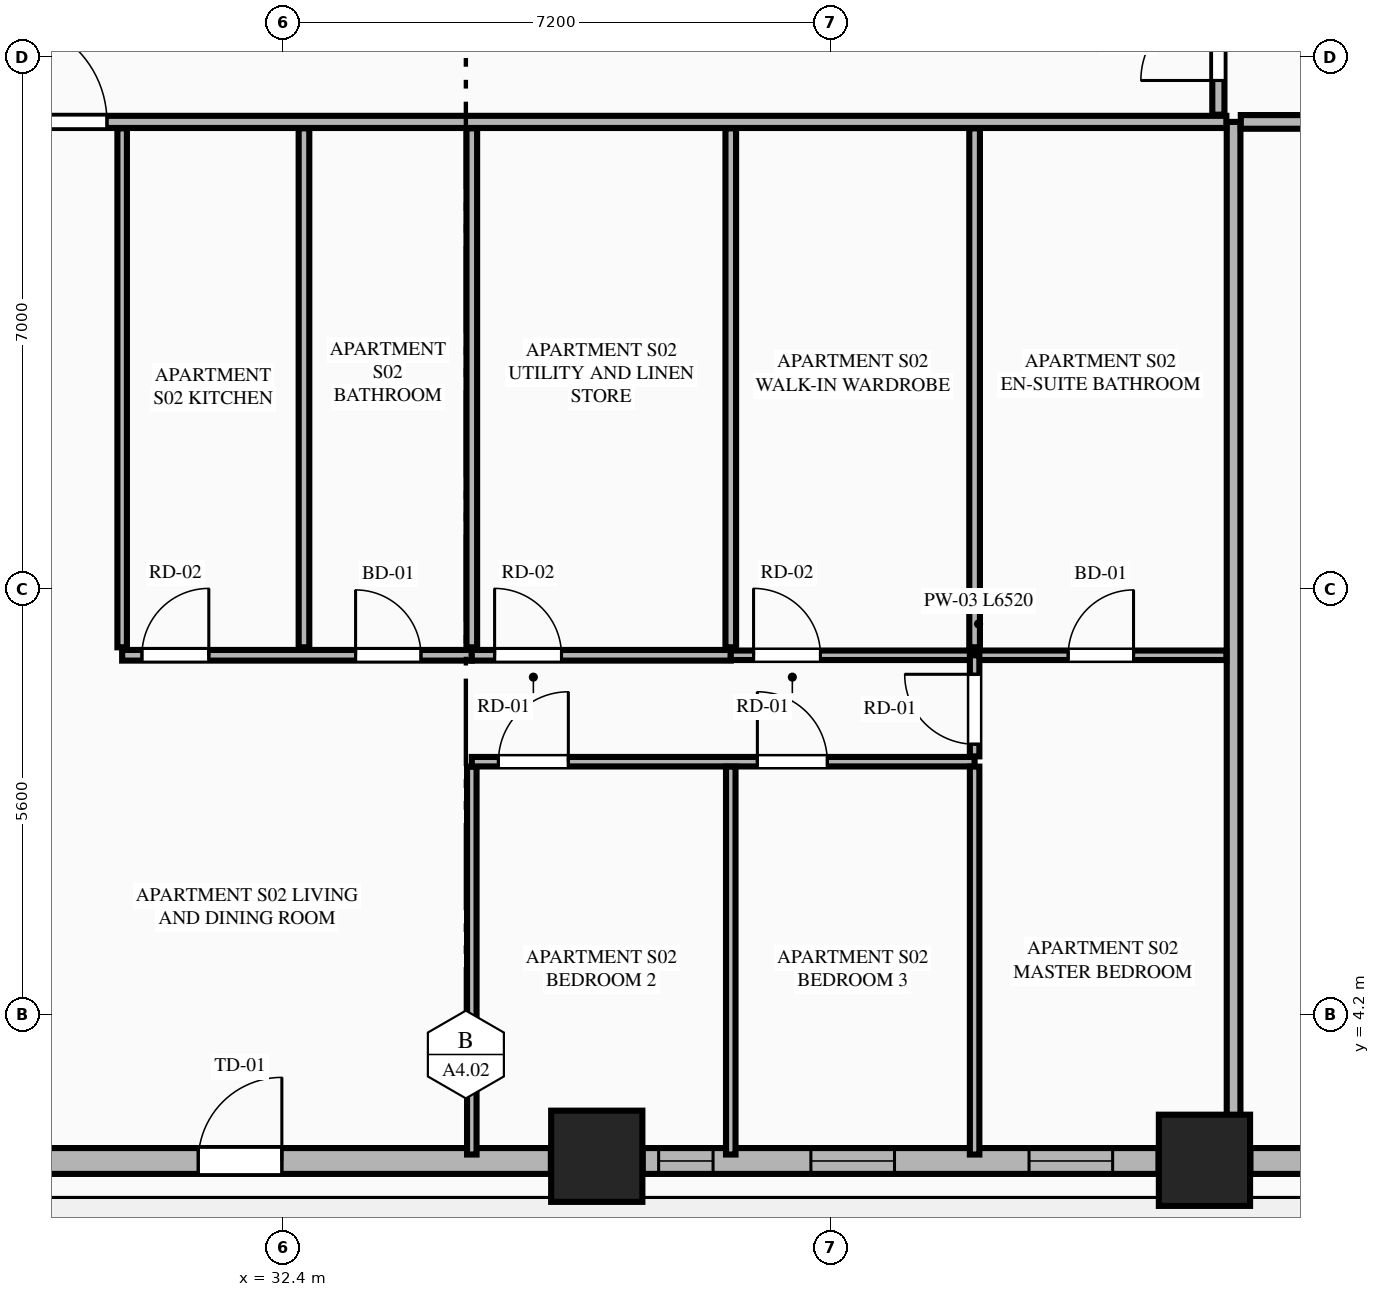
"""IFC4 building model, lengths in metres.
Left out: names, types, materials, properties, quantities, classifications, styles, units other than length and angle.
Written with IfcOpenShell. Run it as: python <this file> out.ifc"""

import sys

from ifc_helpers import new_model, si_unit, direction, frame, frame_2d, origin, origin_2d, place, context, subcontext, project, spatial, rectangle, extrude, element, fill, save


model = new_model("IFC4")
c1 = context("Model", 3, precision=1e-05, world=origin(), true_north=direction((0.0, 1.0)))
c2 = subcontext(c1, "Body", "Model", "MODEL_VIEW")
j1 = project(units=[si_unit("LENGTHUNIT", "METRE"), si_unit("PLANEANGLEUNIT", "RADIAN")], contexts=[c1])
p1 = place(None, origin())
s1 = spatial("IfcSite", under=j1, at=p1, CompositionType="ELEMENT")
p2 = place(p1, origin())
s2 = spatial("IfcBuilding", under=s1, at=p2, CompositionType="ELEMENT")
p3 = place(p2, frame((0.0, 0.0, 32.0)))
s3 = spatial("IfcBuildingStorey", under=s2, at=p3, CompositionType="ELEMENT", Elevation=32.0)
for number, where, z_axis, x_axis in (
    (1, (36.522, 2.342, 0.0), (0.0, 0.0, 1.0), (1.0, 0.0, 0.0)),
    (2, (44.517, 2.289, 0.0), (0.0, 0.0, 1.0), (1.0, 0.0, 0.0)),
):
    element("IfcColumn", number, at=place(p3, frame(where, z_axis=z_axis, x_axis=x_axis)), inside=s3, PredefinedType="COLUMN", context=c2, shape_type="SweptSolid", body=[
        extrude(rectangle(XDim=1.2, YDim=1.2, at=origin_2d()), origin(), (0.0, 0.0, 1.0), 3.55),
    ])
p4 = place(p3, frame((28.882, 2.28, 0.0), z_axis=(0.0, 0.0, 1.0), x_axis=(1.0, 0.0, 0.0)))
e3 = element("IfcWall", 3, at=p4, inside=s3, PredefinedType="STANDARD", context=c2, shape_type="SweptSolid", body=[
    extrude(rectangle(XDim=7.036, YDim=0.34, at=frame_2d((3.518, 0.0))), origin(), (0.0, 0.0, 1.0), 2.787),
])
p5 = place(p4, frame((2.397, 0.0, 0.0)))
e4 = element("IfcOpeningElement", 4, at=p5, cuts=e3, PredefinedType="OPENING", context=c2, shape_type="SweptSolid", body=[
    extrude(rectangle(XDim=1.1, YDim=2.25, at=frame_2d((0.55, 1.125))), frame((0.0, 0.18, 0.0), z_axis=(0.0, -1.0, 0.0), x_axis=(1.0, 0.0, 0.0)), (0.0, 0.0, 1.0), 0.36),
])
p6 = place(p3, frame((37.126, 2.28, 0.0), z_axis=(0.0, 0.0, 1.0), x_axis=(1.0, 0.0, 0.0)))
e5 = element("IfcWall", 5, at=p6, inside=s3, PredefinedType="STANDARD", context=c2, shape_type="SweptSolid", body=[
    extrude(rectangle(XDim=6.787, YDim=0.34, at=frame_2d((3.394, 0.0))), origin(), (0.0, 0.0, 1.0), 2.787),
])
p7 = place(p6, frame((2.213, 0.0, 0.75)))
e6 = element("IfcOpeningElement", 6, at=p7, cuts=e5, PredefinedType="OPENING", context=c2, shape_type="SweptSolid", body=[
    extrude(rectangle(XDim=1.1, YDim=1.887, at=frame_2d((0.55, 0.943))), frame((0.0, 0.18, 0.0), z_axis=(0.0, -1.0, 0.0), x_axis=(1.0, 0.0, 0.0)), (0.0, 0.0, 1.0), 0.36),
])
p8 = place(p6, frame((5.083, 0.0, 0.75)))
e7 = element("IfcOpeningElement", 7, at=p8, cuts=e5, PredefinedType="OPENING", context=c2, shape_type="SweptSolid", body=[
    extrude(rectangle(XDim=1.1, YDim=1.887, at=frame_2d((0.55, 0.943))), frame((0.0, 0.18, 0.0), z_axis=(0.0, -1.0, 0.0), x_axis=(1.0, 0.0, 0.0)), (0.0, 0.0, 1.0), 0.36),
])
p9 = place(p6, frame((0.21, 0.0, 0.75)))
e8 = element("IfcOpeningElement", 8, at=p9, cuts=e5, PredefinedType="OPENING", context=c2, shape_type="SweptSolid", body=[
    extrude(rectangle(XDim=0.716, YDim=1.887, at=frame_2d((0.358, 0.943))), frame((0.0, 0.18, 0.0), z_axis=(0.0, -1.0, 0.0), x_axis=(1.0, 0.0, 0.0)), (0.0, 0.0, 1.0), 0.36),
])
p10 = place(p3, frame((45.121, 2.28, 0.0), z_axis=(0.0, 0.0, 1.0), x_axis=(1.0, 0.0, 0.0)))
e9 = element("IfcWall", 9, at=p10, inside=s3, PredefinedType="STANDARD", context=c2, shape_type="SweptSolid", body=[
    extrude(rectangle(XDim=1.245, YDim=0.34, at=frame_2d((0.623, 0.0))), origin(), (0.0, 0.0, 1.0), 3.33),
])
p11 = place(p3, frame((44.9, 2.455, 0.0), z_axis=(0.0, 0.0, 1.0), x_axis=(0.0, 1.0, 0.0)))
e10 = element("IfcWall", 10, at=p11, inside=s3, PredefinedType="PARTITIONING", context=c2, shape_type="SweptSolid", body=[
    extrude(rectangle(XDim=13.495, YDim=0.18, at=frame_2d((6.748, 0.0))), origin(), (0.0, 0.0, 1.0), 3.33),
])
p12 = place(p3, frame((28.373, 15.95, 0.0), z_axis=(0.0, 0.0, 1.0), x_axis=(1.0, 0.0, 0.0)))
e11 = element("IfcWall", 11, at=p12, inside=s3, PredefinedType="PARTITIONING", context=c2, shape_type="SweptSolid", body=[
    extrude(rectangle(XDim=16.432, YDim=0.16, at=frame_2d((8.216, 0.0))), origin(), (0.0, 0.0, 1.0), 3.33),
])
p13 = place(p12, frame((0.355, 0.0, 0.0)))
e12 = element("IfcOpeningElement", 12, at=p13, cuts=e11, PredefinedType="OPENING", context=c2, shape_type="SweptSolid", body=[
    extrude(rectangle(XDim=1.35, YDim=2.35, at=frame_2d((0.675, 1.175))), frame((0.0, 0.09, 0.0), z_axis=(0.0, -1.0, 0.0), x_axis=(1.0, 0.0, 0.0)), (0.0, 0.0, 1.0), 0.18),
])
p14 = place(p3, frame((30.278, 9.038, 0.0), z_axis=(0.0, 0.0, 1.0), x_axis=(0.0, 1.0, 0.0)))
e13 = element("IfcWall", 13, at=p14, inside=s3, PredefinedType="PARTITIONING", context=c2, shape_type="SweptSolid", body=[
    extrude(rectangle(XDim=6.827, YDim=0.125, at=frame_2d((3.414, 0.0))), origin(), (0.0, 0.0, 1.0), 3.33),
])
p15 = place(p3, frame((30.278, 8.933, 0.0), z_axis=(0.0, 0.0, 1.0), x_axis=(1.0, 0.0, 0.0)))
e14 = element("IfcWall", 14, at=p15, inside=s3, PredefinedType="PLUMBINGWALL", context=c2, shape_type="SweptSolid", body=[
    extrude(rectangle(XDim=4.6, YDim=0.14, at=frame_2d((2.3, 0.0))), origin(), (0.0, 0.0, 1.0), 3.33),
])
p16 = place(p15, frame((3.071, 0.0, 0.0)))
e15 = element("IfcOpeningElement", 15, at=p16, cuts=e14, PredefinedType="OPENING", context=c2, shape_type="SweptSolid", body=[
    extrude(rectangle(XDim=0.86, YDim=2.1, at=frame_2d((0.43, 1.05))), frame((0.0, 0.08, 0.0), z_axis=(0.0, -1.0, 0.0), x_axis=(1.0, 0.0, 0.0)), (0.0, 0.0, 1.0), 0.16),
])
p17 = place(p15, frame((0.26, 0.0, 0.0)))
e16 = element("IfcOpeningElement", 16, at=p17, cuts=e14, PredefinedType="OPENING", context=c2, shape_type="SweptSolid", body=[
    extrude(rectangle(XDim=0.88, YDim=2.15, at=frame_2d((0.44, 1.075))), frame((0.0, 0.08, 0.0), z_axis=(0.0, -1.0, 0.0), x_axis=(1.0, 0.0, 0.0)), (0.0, 0.0, 1.0), 0.16),
])
p18 = place(p3, frame((34.878, 8.933, 0.0), z_axis=(0.0, 0.0, 1.0), x_axis=(1.0, 0.0, 0.0)))
e17 = element("IfcWall", 17, at=p18, inside=s3, PredefinedType="PLUMBINGWALL", context=c2, shape_type="SweptSolid", body=[
    extrude(rectangle(XDim=3.407, YDim=0.14, at=frame_2d((1.704, 0.0))), origin(), (0.0, 0.0, 1.0), 3.33),
])
p19 = place(p18, frame((0.3, 0.0, 0.0)))
e18 = element("IfcOpeningElement", 18, at=p19, cuts=e17, PredefinedType="OPENING", context=c2, shape_type="SweptSolid", body=[
    extrude(rectangle(XDim=0.88, YDim=2.15, at=frame_2d((0.44, 1.075))), frame((0.0, 0.08, 0.0), z_axis=(0.0, -1.0, 0.0), x_axis=(1.0, 0.0, 0.0)), (0.0, 0.0, 1.0), 0.16),
])
p20 = place(p3, frame((38.285, 8.933, 0.0), z_axis=(0.0, 0.0, 1.0), x_axis=(1.0, 0.0, 0.0)))
e19 = element("IfcWall", 19, at=p20, inside=s3, PredefinedType="PARTITIONING", context=c2, shape_type="SweptSolid", body=[
    extrude(rectangle(XDim=6.52, YDim=0.125, at=frame_2d((3.26, 0.0))), origin(), (0.0, 0.0, 1.0), 3.33),
])
p21 = place(p20, frame((4.439, 0.0, 0.0)))
e20 = element("IfcOpeningElement", 20, at=p21, cuts=e19, PredefinedType="OPENING", context=c2, shape_type="SweptSolid", body=[
    extrude(rectangle(XDim=0.86, YDim=2.1, at=frame_2d((0.43, 1.05))), frame((0.0, 0.073, 0.0), z_axis=(0.0, -1.0, 0.0), x_axis=(1.0, 0.0, 0.0)), (0.0, 0.0, 1.0), 0.145),
])
p22 = place(p20, frame((0.3, 0.0, 0.0)))
e21 = element("IfcOpeningElement", 21, at=p22, cuts=e19, PredefinedType="OPENING", context=c2, shape_type="SweptSolid", body=[
    extrude(rectangle(XDim=0.88, YDim=2.15, at=frame_2d((0.44, 1.075))), frame((0.0, 0.073, 0.0), z_axis=(0.0, -1.0, 0.0), x_axis=(1.0, 0.0, 0.0)), (0.0, 0.0, 1.0), 0.145),
])
p23 = place(p3, frame((32.67, 9.038, 0.0), z_axis=(0.0, 0.0, 1.0), x_axis=(0.0, 1.0, 0.0)))
e22 = element("IfcWall", 22, at=p23, inside=s3, PredefinedType="PLUMBINGWALL", context=c2, shape_type="SweptSolid", body=[
    extrude(rectangle(XDim=6.827, YDim=0.14, at=frame_2d((3.414, 0.0))), origin(), (0.0, 0.0, 1.0), 3.33),
])
p24 = place(p3, frame((34.878, 2.365, 0.0), z_axis=(0.0, 0.0, 1.0), x_axis=(0.0, 1.0, 0.0)))
e23 = element("IfcWall", 23, at=p24, inside=s3, PredefinedType="PARTITIONING", context=c2, shape_type="SweptSolid", body=[
    extrude(rectangle(XDim=5.103, YDim=0.125, at=frame_2d((2.552, 0.0))), origin(), (0.0, 0.0, 1.0), 3.33),
])
p25 = place(p3, frame((34.878, 7.533, 0.0), z_axis=(0.0, 0.0, 1.0), x_axis=(1.0, 0.0, 0.0)))
e24 = element("IfcWall", 24, at=p25, inside=s3, PredefinedType="PARTITIONING", context=c2, shape_type="SweptSolid", body=[
    extrude(rectangle(XDim=6.615, YDim=0.125, at=frame_2d((3.308, 0.0))), origin(), (0.0, 0.0, 1.0), 3.33),
])
p26 = place(p25, frame((0.35, 0.0, 0.0)))
e25 = element("IfcOpeningElement", 25, at=p26, cuts=e24, PredefinedType="OPENING", context=c2, shape_type="SweptSolid", body=[
    extrude(rectangle(XDim=0.92, YDim=2.15, at=frame_2d((0.46, 1.075))), frame((0.0, 0.073, 0.0), z_axis=(0.0, -1.0, 0.0), x_axis=(1.0, 0.0, 0.0)), (0.0, 0.0, 1.0), 0.145),
])
p27 = place(p25, frame((3.757, 0.0, 0.0)))
e26 = element("IfcOpeningElement", 26, at=p27, cuts=e24, PredefinedType="OPENING", context=c2, shape_type="SweptSolid", body=[
    extrude(rectangle(XDim=0.92, YDim=2.15, at=frame_2d((0.46, 1.075))), frame((0.0, 0.073, 0.0), z_axis=(0.0, -1.0, 0.0), x_axis=(1.0, 0.0, 0.0)), (0.0, 0.0, 1.0), 0.145),
])
p28 = place(p3, frame((41.493, 7.603, 0.0), z_axis=(0.0, 0.0, 1.0), x_axis=(0.0, 1.0, 0.0)))
e27 = element("IfcWall", 27, at=p28, inside=s3, PredefinedType="PARTITIONING", context=c2, shape_type="SweptSolid", body=[
    extrude(rectangle(XDim=1.33, YDim=0.125, at=frame_2d((0.665, 0.0))), origin(), (0.0, 0.0, 1.0), 3.33),
])
p29 = place(p28, frame((0.16, 0.0, 0.0)))
e28 = element("IfcOpeningElement", 28, at=p29, cuts=e27, PredefinedType="OPENING", context=c2, shape_type="SweptSolid", body=[
    extrude(rectangle(XDim=0.92, YDim=2.15, at=frame_2d((0.46, 1.075))), frame((0.0, 0.073, 0.0), z_axis=(0.0, -1.0, 0.0), x_axis=(1.0, 0.0, 0.0)), (0.0, 0.0, 1.0), 0.145),
])
for number, where, z_axis, x_axis in (
    (29, (34.878, 9.038, 0.0), (0.0, 0.0, 1.0), (0.0, 1.0, 0.0)),
    (30, (38.285, 9.038, 0.0), (0.0, 0.0, 1.0), (0.0, 1.0, 0.0)),
):
    element("IfcWall", number, at=place(p3, frame(where, z_axis=z_axis, x_axis=x_axis)), inside=s3, PredefinedType="PLUMBINGWALL", context=c2, shape_type="SweptSolid", body=[
        extrude(rectangle(XDim=6.827, YDim=0.14, at=frame_2d((3.414, 0.0))), origin(), (0.0, 0.0, 1.0), 3.33),
    ])
for number, where, z_axis, x_axis in (
    (31, (38.285, 2.365, 0.0), (0.0, 0.0, 1.0), (0.0, 1.0, 0.0)),
    (32, (41.493, 2.365, 0.0), (0.0, 0.0, 1.0), (0.0, 1.0, 0.0)),
):
    element("IfcWall", number, at=place(p3, frame(where, z_axis=z_axis, x_axis=x_axis)), inside=s3, PredefinedType="PARTITIONING", context=c2, shape_type="SweptSolid", body=[
        extrude(rectangle(XDim=5.103, YDim=0.125, at=frame_2d((2.552, 0.0))), origin(), (0.0, 0.0, 1.0), 3.33),
    ])
p30 = place(p3, frame((41.493, 9.038, 0.0), z_axis=(0.0, 0.0, 1.0), x_axis=(0.0, 1.0, 0.0)))
e33 = element("IfcWall", 33, at=p30, inside=s3, PredefinedType="PLUMBINGWALL", context=c2, shape_type="SweptSolid", body=[
    extrude(rectangle(XDim=6.827, YDim=0.14, at=frame_2d((3.414, 0.0))), origin(), (0.0, 0.0, 1.0), 3.33),
])
p31 = place(p3, frame((44.995, 15.95, 0.0), z_axis=(0.0, 0.0, 1.0), x_axis=(1.0, 0.0, 0.0)))
e34 = element("IfcWall", 34, at=p31, inside=s3, PredefinedType="PARTITIONING", context=c2, shape_type="SweptSolid", body=[
    extrude(rectangle(XDim=9.241, YDim=0.18, at=frame_2d((4.621, 0.0))), origin(), (0.0, 0.0, 1.0), 3.33),
])
p32 = place(p3, frame((44.7, 16.045, 0.0), z_axis=(0.0, 0.0, 1.0), x_axis=(0.0, 1.0, 0.0)))
e35 = element("IfcWall", 35, at=p32, inside=s3, PredefinedType="PARTITIONING", context=c2, shape_type="SweptSolid", body=[
    extrude(rectangle(XDim=19.71, YDim=0.16, at=frame_2d((9.855, 0.0))), origin(), (0.0, 0.0, 1.0), 3.33),
])
p33 = place(p32, frame((0.45, 0.0, 0.0)))
e36 = element("IfcOpeningElement", 36, at=p33, cuts=e35, PredefinedType="OPENING", context=c2, shape_type="SweptSolid", body=[
    extrude(rectangle(XDim=1.02, YDim=2.25, at=frame_2d((0.51, 1.125))), frame((0.0, 0.09, 0.0), z_axis=(0.0, -1.0, 0.0), x_axis=(1.0, 0.0, 0.0)), (0.0, 0.0, 1.0), 0.18),
])
p34 = place(p5, origin())
e37 = element("IfcDoor", 37, at=p34, inside=s3, OperationType="SINGLE_SWING_RIGHT", PredefinedType="DOOR", context=c2, shape_type="SweptSolid", body=[
    extrude(rectangle(XDim=1.1, YDim=2.25, at=frame_2d((0.55, 1.125))), frame((0.0, 0.025, 0.0), z_axis=(0.0, -1.0, 0.0), x_axis=(1.0, 0.0, 0.0)), (0.0, 0.0, 1.0), 0.05),
])
fill(e4, e37)
p35 = place(p7, origin())
e38 = element("IfcWindow", 38, at=p35, inside=s3, PartitioningType="SINGLE_PANEL", PredefinedType="WINDOW", context=c2, shape_type="SweptSolid", body=[
    extrude(rectangle(XDim=1.1, YDim=1.887, at=frame_2d((0.55, 0.943))), frame((0.0, 0.03, 0.0), z_axis=(0.0, -1.0, 0.0), x_axis=(1.0, 0.0, 0.0)), (0.0, 0.0, 1.0), 0.06),
])
fill(e6, e38)
p36 = place(p16, origin())
e39 = element("IfcDoor", 39, at=p36, inside=s3, OperationType="SINGLE_SWING_LEFT", PredefinedType="DOOR", context=c2, shape_type="SweptSolid", body=[
    extrude(rectangle(XDim=0.86, YDim=2.1, at=frame_2d((0.43, 1.05))), frame((0.0, 0.025, 0.0), z_axis=(0.0, -1.0, 0.0), x_axis=(1.0, 0.0, 0.0)), (0.0, 0.0, 1.0), 0.05),
])
fill(e15, e39)
p37 = place(p21, origin())
e40 = element("IfcDoor", 40, at=p37, inside=s3, OperationType="SINGLE_SWING_RIGHT", PredefinedType="DOOR", context=c2, shape_type="SweptSolid", body=[
    extrude(rectangle(XDim=0.86, YDim=2.1, at=frame_2d((0.43, 1.05))), frame((0.0, 0.025, 0.0), z_axis=(0.0, -1.0, 0.0), x_axis=(1.0, 0.0, 0.0)), (0.0, 0.0, 1.0), 0.05),
])
fill(e20, e40)
p38 = place(p13, origin())
e41 = element("IfcDoor", 41, at=p38, inside=s3, OperationType="SINGLE_SWING_LEFT", PredefinedType="DOOR", context=c2, shape_type="SweptSolid", body=[
    extrude(rectangle(XDim=1.35, YDim=2.35, at=frame_2d((0.675, 1.175))), frame((0.0, 0.025, 0.0), z_axis=(0.0, -1.0, 0.0), x_axis=(1.0, 0.0, 0.0)), (0.0, 0.0, 1.0), 0.05),
])
fill(e12, e41)
p39 = place(p17, origin())
e42 = element("IfcDoor", 42, at=p39, inside=s3, OperationType="SINGLE_SWING_RIGHT", PredefinedType="DOOR", context=c2, shape_type="SweptSolid", body=[
    extrude(rectangle(XDim=0.88, YDim=2.15, at=frame_2d((0.44, 1.075))), frame((0.0, 0.025, 0.0), z_axis=(0.0, -1.0, 0.0), x_axis=(1.0, 0.0, 0.0)), (0.0, 0.0, 1.0), 0.05),
])
fill(e16, e42)
p40 = place(p19, origin())
e43 = element("IfcDoor", 43, at=p40, inside=s3, OperationType="SINGLE_SWING_LEFT", PredefinedType="DOOR", context=c2, shape_type="SweptSolid", body=[
    extrude(rectangle(XDim=0.88, YDim=2.15, at=frame_2d((0.44, 1.075))), frame((0.0, 0.025, 0.0), z_axis=(0.0, -1.0, 0.0), x_axis=(1.0, 0.0, 0.0)), (0.0, 0.0, 1.0), 0.05),
])
fill(e18, e43)
p41 = place(p26, origin())
e44 = element("IfcDoor", 44, at=p41, inside=s3, OperationType="SINGLE_SWING_RIGHT", PredefinedType="DOOR", context=c2, shape_type="SweptSolid", body=[
    extrude(rectangle(XDim=0.92, YDim=2.15, at=frame_2d((0.46, 1.075))), frame((0.0, 0.025, 0.0), z_axis=(0.0, -1.0, 0.0), x_axis=(1.0, 0.0, 0.0)), (0.0, 0.0, 1.0), 0.05),
])
fill(e25, e44)
p42 = place(p27, origin())
e45 = element("IfcDoor", 45, at=p42, inside=s3, OperationType="SINGLE_SWING_LEFT", PredefinedType="DOOR", context=c2, shape_type="SweptSolid", body=[
    extrude(rectangle(XDim=0.92, YDim=2.15, at=frame_2d((0.46, 1.075))), frame((0.0, 0.025, 0.0), z_axis=(0.0, -1.0, 0.0), x_axis=(1.0, 0.0, 0.0)), (0.0, 0.0, 1.0), 0.05),
])
fill(e26, e45)
p43 = place(p29, origin())
e46 = element("IfcDoor", 46, at=p43, inside=s3, OperationType="SINGLE_SWING_RIGHT", PredefinedType="DOOR", context=c2, shape_type="SweptSolid", body=[
    extrude(rectangle(XDim=0.92, YDim=2.15, at=frame_2d((0.46, 1.075))), frame((0.0, 0.025, 0.0), z_axis=(0.0, -1.0, 0.0), x_axis=(1.0, 0.0, 0.0)), (0.0, 0.0, 1.0), 0.05),
])
fill(e28, e46)
p44 = place(p22, origin())
e47 = element("IfcDoor", 47, at=p44, inside=s3, OperationType="SINGLE_SWING_LEFT", PredefinedType="DOOR", context=c2, shape_type="SweptSolid", body=[
    extrude(rectangle(XDim=0.88, YDim=2.15, at=frame_2d((0.44, 1.075))), frame((0.0, 0.025, 0.0), z_axis=(0.0, -1.0, 0.0), x_axis=(1.0, 0.0, 0.0)), (0.0, 0.0, 1.0), 0.05),
])
fill(e21, e47)
p45 = place(p33, origin())
e48 = element("IfcDoor", 48, at=p45, inside=s3, OperationType="SINGLE_SWING_LEFT", PredefinedType="DOOR", context=c2, shape_type="SweptSolid", body=[
    extrude(rectangle(XDim=1.02, YDim=2.25, at=frame_2d((0.51, 1.125))), frame((0.0, 0.025, 0.0), z_axis=(0.0, -1.0, 0.0), x_axis=(1.0, 0.0, 0.0)), (0.0, 0.0, 1.0), 0.05),
])
fill(e36, e48)
p46 = place(p8, origin())
e49 = element("IfcWindow", 49, at=p46, inside=s3, PartitioningType="SINGLE_PANEL", PredefinedType="WINDOW", context=c2, shape_type="SweptSolid", body=[
    extrude(rectangle(XDim=1.1, YDim=1.887, at=frame_2d((0.55, 0.943))), frame((0.0, 0.03, 0.0), z_axis=(0.0, -1.0, 0.0), x_axis=(1.0, 0.0, 0.0)), (0.0, 0.0, 1.0), 0.06),
])
fill(e7, e49)
p47 = place(p9, origin())
e50 = element("IfcWindow", 50, at=p47, inside=s3, PartitioningType="SINGLE_PANEL", PredefinedType="WINDOW", context=c2, shape_type="SweptSolid", body=[
    extrude(rectangle(XDim=0.716, YDim=1.887, at=frame_2d((0.358, 0.943))), frame((0.0, 0.03, 0.0), z_axis=(0.0, -1.0, 0.0), x_axis=(1.0, 0.0, 0.0)), (0.0, 0.0, 1.0), 0.06),
])
fill(e8, e50)
save(model, sys.argv[1])
